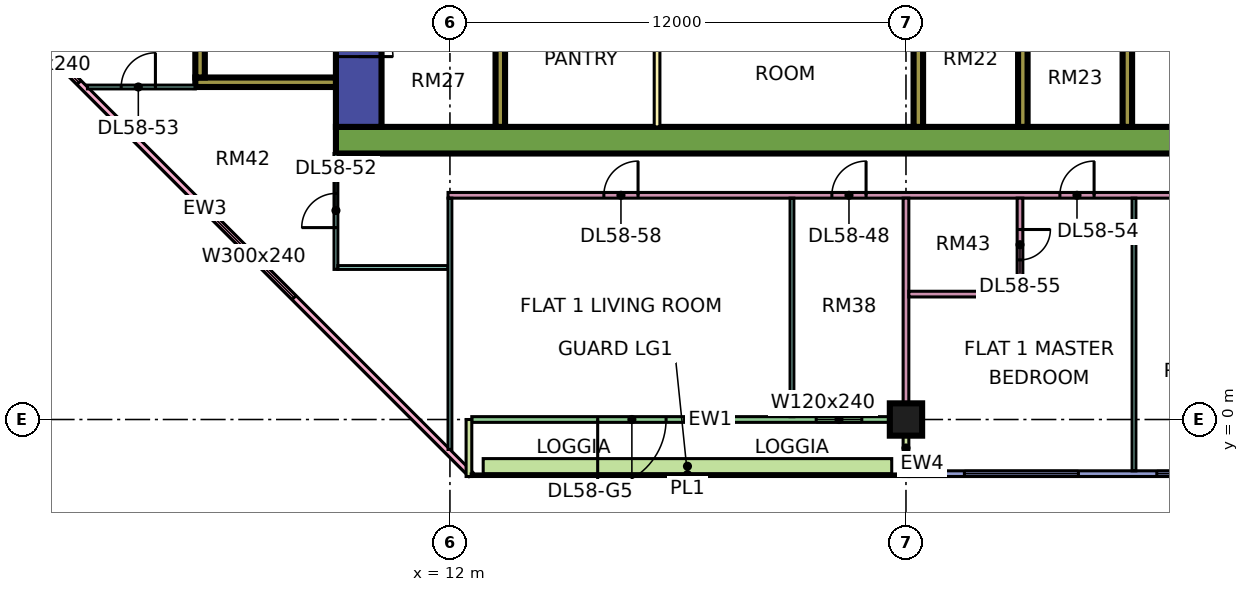
"""IFC4 building model, lengths in metres.
Left out: names, types, materials, properties, quantities, classifications, styles, units other than length and angle.
Written with IfcOpenShell. Run it as: python <this file> out.ifc"""

import sys

from ifc_helpers import new_model, si_unit, direction, frame, frame_2d, origin, origin_2d, place, context, subcontext, project, spatial, rectangle, extrude, element, fill, save


model = new_model("IFC4")
c1 = context("Model", 3, precision=1e-05, world=origin(), true_north=direction((0.0, 1.0)))
c2 = subcontext(c1, "Body", "Model", "MODEL_VIEW")
j1 = project(units=[si_unit("LENGTHUNIT", "METRE"), si_unit("PLANEANGLEUNIT", "RADIAN")], contexts=[c1])
p1 = place(None, origin())
s1 = spatial("IfcSite", under=j1, at=p1, CompositionType="ELEMENT")
p2 = place(p1, origin())
s2 = spatial("IfcBuilding", under=s1, at=p2, CompositionType="ELEMENT")
p3 = place(p2, frame((0.0, 0.0, 245.4)))
s3 = spatial("IfcBuildingStorey", under=s2, at=p3, CompositionType="ELEMENT", Elevation=245.4)
p4 = place(p3, frame((24.0, 0.0, 0.0), z_axis=(0.0, 0.0, 1.0), x_axis=(1.0, 0.0, 0.0)))
e1 = element("IfcColumn", 1, at=p4, inside=s3, PredefinedType="COLUMN", context=c2, shape_type="SweptSolid", body=[
    extrude(rectangle(XDim=0.85, YDim=0.85, at=origin_2d()), origin(), (0.0, 0.0, 1.0), 3.75),
])
p5 = place(p3, frame((9.0, 7.35, 0.0), z_axis=(0.0, 0.0, 1.0), x_axis=(1.0, 0.0, 0.0)))
e2 = element("IfcWall", 2, at=p5, inside=s3, PredefinedType="SHEAR", context=c2, shape_type="SweptSolid", body=[
    extrude(rectangle(XDim=25.0, YDim=0.7, at=frame_2d((12.5, 0.0))), origin(), (0.0, 0.0, 1.0), 3.75),
])
p6 = place(p3, frame((9.6, 7.7, 0.0), z_axis=(0.0, 0.0, 1.0), x_axis=(0.0, 1.0, 0.0)))
e3 = element("IfcWall", 3, at=p6, inside=s3, PredefinedType="SHEAR", context=c2, shape_type="SweptSolid", body=[
    extrude(rectangle(XDim=11.6, YDim=1.2, at=frame_2d((5.8, 0.0))), origin(), (0.0, 0.0, 1.0), 3.75),
])
p7 = place(p6, frame((4.175, 0.0, 0.0)))
e4 = element("IfcOpeningElement", 4, at=p7, cuts=e3, PredefinedType="OPENING", context=c2, shape_type="SweptSolid", body=[
    extrude(rectangle(XDim=1.1, YDim=2.2, at=frame_2d((0.55, 1.1))), frame((0.0, 0.61, 0.0), z_axis=(0.0, -1.0, 0.0), x_axis=(1.0, 0.0, 0.0)), (0.0, 0.0, 1.0), 1.22),
])
p8 = place(p6, frame((6.675, 0.0, 0.0)))
e5 = element("IfcOpeningElement", 5, at=p8, cuts=e3, PredefinedType="OPENING", context=c2, shape_type="SweptSolid", body=[
    extrude(rectangle(XDim=1.1, YDim=2.2, at=frame_2d((0.55, 1.1))), frame((0.0, 0.61, 0.0), z_axis=(0.0, -1.0, 0.0), x_axis=(1.0, 0.0, 0.0)), (0.0, 0.0, 1.0), 1.22),
])
p9 = place(p6, frame((9.55, 0.0, 0.0)))
e6 = element("IfcOpeningElement", 6, at=p9, cuts=e3, PredefinedType="OPENING", context=c2, shape_type="SweptSolid", body=[
    extrude(rectangle(XDim=1.1, YDim=2.2, at=frame_2d((0.55, 1.1))), frame((0.0, 0.61, 0.0), z_axis=(0.0, -1.0, 0.0), x_axis=(1.0, 0.0, 0.0)), (0.0, 0.0, 1.0), 1.22),
])
p10 = place(p6, frame((1.85, 0.0, 0.0)))
e7 = element("IfcOpeningElement", 7, at=p10, cuts=e3, PredefinedType="OPENING", context=c2, shape_type="SweptSolid", body=[
    extrude(rectangle(XDim=0.9, YDim=2.1, at=frame_2d((0.45, 1.05))), frame((0.0, 0.61, 0.0), z_axis=(0.0, -1.0, 0.0), x_axis=(1.0, 0.0, 0.0)), (0.0, 0.0, 1.0), 1.22),
])
p11 = place(p3, frame((13.325, 7.7, 0.0), z_axis=(0.0, 0.0, 1.0), x_axis=(0.0, 1.0, 0.0)))
e8 = element("IfcWall", 8, at=p11, inside=s3, PredefinedType="SHEAR", context=c2, shape_type="SweptSolid", body=[
    extrude(rectangle(XDim=11.6, YDim=0.25, at=frame_2d((5.8, 0.0))), origin(), (0.0, 0.0, 1.0), 3.75),
])
for number, where, z_axis, x_axis in (
    (9, (24.325, 7.7, 0.0), (0.0, 0.0, 1.0), (0.0, 1.0, 0.0)),
    (10, (27.075, 7.7, 0.0), (0.0, 0.0, 1.0), (0.0, 1.0, 0.0)),
    (11, (29.825, 7.7, 0.0), (0.0, 0.0, 1.0), (0.0, 1.0, 0.0)),
):
    element("IfcWall", number, at=place(p3, frame(where, z_axis=z_axis, x_axis=x_axis)), inside=s3, PredefinedType="SHEAR", context=c2, shape_type="SweptSolid", body=[
        extrude(rectangle(XDim=3.5, YDim=0.25, at=frame_2d((1.75, 0.0))), origin(), (0.0, 0.0, 1.0), 3.75),
    ])
p12 = place(p3, frame((5.3, 8.875, 0.0), z_axis=(0.0, 0.0, 1.0), x_axis=(1.0, 0.0, 0.0)))
e12 = element("IfcWall", 12, at=p12, inside=s3, PredefinedType="SHEAR", context=c2, shape_type="SweptSolid", body=[
    extrude(rectangle(XDim=3.7, YDim=0.25, at=frame_2d((1.85, 0.0))), origin(), (0.0, 0.0, 1.0), 3.75),
])
p13 = place(p3, frame((5.425, 9.0, 0.0), z_axis=(0.0, 0.0, 1.0), x_axis=(0.0, 1.0, 0.0)))
e13 = element("IfcWall", 13, at=p13, inside=s3, PredefinedType="SHEAR", context=c2, shape_type="SweptSolid", body=[
    extrude(rectangle(XDim=4.0, YDim=0.25, at=frame_2d((2.0, 0.0))), origin(), (0.0, 0.0, 1.0), 3.75),
])
p14 = place(p3, frame((-1.447, 12.553, 0.0), z_axis=(0.0, 0.0, 1.0), x_axis=(0.707106781187, -0.707106781187, 0.0)))
e14 = element("IfcWall", 14, at=p14, inside=s3, PredefinedType="SOLIDWALL", context=c2, shape_type="SweptSolid", body=[
    extrude(rectangle(XDim=19.799, YDim=0.15, at=frame_2d((9.899, 0.0))), origin(), (0.0, 0.0, 1.0), 3.35),
])
p15 = place(p14, frame((2.212, 0.0, 0.45)))
e15 = element("IfcOpeningElement", 15, at=p15, cuts=e14, PredefinedType="OPENING", context=c2, shape_type="SweptSolid", body=[
    extrude(rectangle(XDim=3.0, YDim=2.4, at=frame_2d((1.5, 1.2))), frame((0.0, 0.085, 0.0), z_axis=(0.0, -1.0, 0.0), x_axis=(1.0, 0.0, 0.0)), (0.0, 0.0, 1.0), 0.17),
])
p16 = place(p14, frame((10.216, 0.0, 0.45)))
e16 = element("IfcOpeningElement", 16, at=p16, cuts=e14, PredefinedType="OPENING", context=c2, shape_type="SweptSolid", body=[
    extrude(rectangle(XDim=3.0, YDim=2.4, at=frame_2d((1.5, 1.2))), frame((0.0, 0.085, 0.0), z_axis=(0.0, -1.0, 0.0), x_axis=(1.0, 0.0, 0.0)), (0.0, 0.0, 1.0), 0.17),
])
p17 = place(p3, frame((12.575, 0.0, 0.0), z_axis=(0.0, 0.0, 1.0), x_axis=(1.0, 0.0, 0.0)))
e17 = element("IfcWall", 17, at=p17, inside=s3, PredefinedType="SOLIDWALL", context=c2, shape_type="SweptSolid", body=[
    extrude(rectangle(XDim=11.35, YDim=0.15, at=frame_2d((5.675, 0.0))), origin(), (0.0, 0.0, 1.0), 3.35),
])
p18 = place(p17, frame((3.312, 0.0, 0.0)))
e18 = element("IfcOpeningElement", 18, at=p18, cuts=e17, PredefinedType="OPENING", context=c2, shape_type="SweptSolid", body=[
    extrude(rectangle(XDim=1.8, YDim=2.4, at=frame_2d((0.9, 1.2))), frame((0.0, 0.085, 0.0), z_axis=(0.0, -1.0, 0.0), x_axis=(1.0, 0.0, 0.0)), (0.0, 0.0, 1.0), 0.17),
])
p19 = place(p17, frame((9.062, 0.0, 0.45)))
e19 = element("IfcOpeningElement", 19, at=p19, cuts=e17, PredefinedType="OPENING", context=c2, shape_type="SweptSolid", body=[
    extrude(rectangle(XDim=1.2, YDim=2.4, at=frame_2d((0.6, 1.2))), frame((0.0, 0.085, 0.0), z_axis=(0.0, -1.0, 0.0), x_axis=(1.0, 0.0, 0.0)), (0.0, 0.0, 1.0), 0.17),
])
for number, where, z_axis, x_axis in (
    (20, (12.5, -1.5, 0.0), (0.0, 0.0, 1.0), (0.0, 1.0, 0.0)),
    (21, (24.0, -1.5, 0.0), (0.0, 0.0, 1.0), (0.0, 1.0, 0.0)),
):
    element("IfcWall", number, at=place(p3, frame(where, z_axis=z_axis, x_axis=x_axis)), inside=s3, PredefinedType="SOLIDWALL", context=c2, shape_type="SweptSolid", body=[
        extrude(rectangle(XDim=1.5, YDim=0.15, at=frame_2d((0.75, 0.0))), origin(), (0.0, 0.0, 1.0), 3.35),
    ])
p20 = place(p3, frame((24.075, -1.425, 0.0), z_axis=(0.0, 0.0, 1.0), x_axis=(1.0, 0.0, 0.0)))
e22 = element("IfcWall", 22, at=p20, inside=s3, PredefinedType="SOLIDWALL", context=c2, shape_type="SweptSolid", body=[
    extrude(rectangle(XDim=11.85, YDim=0.15, at=frame_2d((5.925, 0.0))), origin(), (0.0, 0.0, 1.0), 3.35),
])
p21 = place(p20, frame((1.462, 0.0, 0.45)))
e23 = element("IfcOpeningElement", 23, at=p21, cuts=e22, PredefinedType="OPENING", context=c2, shape_type="SweptSolid", body=[
    extrude(rectangle(XDim=3.0, YDim=2.4, at=frame_2d((1.5, 1.2))), frame((0.0, 0.085, 0.0), z_axis=(0.0, -1.0, 0.0), x_axis=(1.0, 0.0, 0.0)), (0.0, 0.0, 1.0), 0.17),
])
p22 = place(p20, frame((6.525, 0.0, 0.45)))
e24 = element("IfcOpeningElement", 24, at=p22, cuts=e22, PredefinedType="OPENING", context=c2, shape_type="SweptSolid", body=[
    extrude(rectangle(XDim=1.8, YDim=2.4, at=frame_2d((0.9, 1.2))), frame((0.0, 0.085, 0.0), z_axis=(0.0, -1.0, 0.0), x_axis=(1.0, 0.0, 0.0)), (0.0, 0.0, 1.0), 0.17),
])
p23 = place(p20, frame((9.488, 0.0, 0.45)))
e25 = element("IfcOpeningElement", 25, at=p23, cuts=e22, PredefinedType="OPENING", context=c2, shape_type="SweptSolid", body=[
    extrude(rectangle(XDim=1.8, YDim=2.4, at=frame_2d((0.9, 1.2))), frame((0.0, 0.085, 0.0), z_axis=(0.0, -1.0, 0.0), x_axis=(1.0, 0.0, 0.0)), (0.0, 0.0, 1.0), 0.17),
])
p24 = place(p3, frame((12.875, -1.229, 0.0), z_axis=(0.0, 0.0, 1.0), x_axis=(1.0, 0.0, 0.0)))
e26 = element("IfcWall", 26, at=p24, inside=s3, PredefinedType="SOLIDWALL", context=c2, shape_type="SweptSolid", body=[
    extrude(rectangle(XDim=10.75, YDim=0.4, at=frame_2d((5.375, 0.0))), origin(), (0.0, 0.0, 1.0), 0.7),
])
p25 = place(p3, frame((17.45, 7.7, 0.0), z_axis=(0.0, 0.0, 1.0), x_axis=(0.0, 1.0, 0.0)))
e27 = element("IfcWall", 27, at=p25, inside=s3, PredefinedType="PARTITIONING", context=c2, shape_type="SweptSolid", body=[
    extrude(rectangle(XDim=3.5, YDim=0.15, at=frame_2d((1.75, 0.0))), origin(), (0.0, 0.0, 1.0), 3.35),
])
p26 = place(p3, frame((2.461, 8.75, 0.0), z_axis=(0.0, 0.0, 1.0), x_axis=(1.0, 0.0, 0.0)))
e28 = element("IfcWall", 28, at=p26, inside=s3, PredefinedType="PARTITIONING", context=c2, shape_type="SweptSolid", body=[
    extrude(rectangle(XDim=2.839, YDim=0.1, at=frame_2d((1.419, 0.0))), origin(), (0.0, 0.0, 1.0), 3.35),
])
p27 = place(p26, frame((0.889, 0.0, 0.0)))
e29 = element("IfcOpeningElement", 29, at=p27, cuts=e28, PredefinedType="OPENING", context=c2, shape_type="SweptSolid", body=[
    extrude(rectangle(XDim=0.9, YDim=2.1, at=frame_2d((0.45, 1.05))), frame((0.0, 0.06, 0.0), z_axis=(0.0, -1.0, 0.0), x_axis=(1.0, 0.0, 0.0)), (0.0, 0.0, 1.0), 0.12),
])
p28 = place(p3, frame((9.0, 3.95, 0.0), z_axis=(0.0, 0.0, 1.0), x_axis=(0.0, 1.0, 0.0)))
e30 = element("IfcWall", 30, at=p28, inside=s3, PredefinedType="PARTITIONING", context=c2, shape_type="SweptSolid", body=[
    extrude(rectangle(XDim=3.05, YDim=0.1, at=frame_2d((1.525, 0.0))), origin(), (0.0, 0.0, 1.0), 3.35),
])
p29 = place(p28, frame((1.1, 0.0, 0.0)))
e31 = element("IfcOpeningElement", 31, at=p29, cuts=e30, PredefinedType="OPENING", context=c2, shape_type="SweptSolid", body=[
    extrude(rectangle(XDim=0.9, YDim=2.1, at=frame_2d((0.45, 1.05))), frame((0.0, 0.06, 0.0), z_axis=(0.0, -1.0, 0.0), x_axis=(1.0, 0.0, 0.0)), (0.0, 0.0, 1.0), 0.12),
])
p30 = place(p3, frame((9.05, 4.0, 0.0), z_axis=(0.0, 0.0, 1.0), x_axis=(1.0, 0.0, 0.0)))
e32 = element("IfcWall", 32, at=p30, inside=s3, PredefinedType="PARTITIONING", context=c2, shape_type="SweptSolid", body=[
    extrude(rectangle(XDim=2.9, YDim=0.1, at=frame_2d((1.45, 0.0))), origin(), (0.0, 0.0, 1.0), 3.35),
])
p31 = place(p3, frame((11.95, 5.9, 0.0), z_axis=(0.0, 0.0, 1.0), x_axis=(1.0, 0.0, 0.0)))
e33 = element("IfcWall", 33, at=p31, inside=s3, PredefinedType="PARTITIONING", context=c2, shape_type="SweptSolid", body=[
    extrude(rectangle(XDim=21.1, YDim=0.15, at=frame_2d((10.55, 0.0))), origin(), (0.0, 0.0, 1.0), 3.35),
])
p32 = place(p31, frame((10.1, 0.0, 0.0)))
e34 = element("IfcOpeningElement", 34, at=p32, cuts=e33, PredefinedType="OPENING", context=c2, shape_type="SweptSolid", body=[
    extrude(rectangle(XDim=0.9, YDim=2.1, at=frame_2d((0.45, 1.05))), frame((0.0, 0.085, 0.0), z_axis=(0.0, -1.0, 0.0), x_axis=(1.0, 0.0, 0.0)), (0.0, 0.0, 1.0), 0.17),
])
p33 = place(p31, frame((16.1, 0.0, 0.0)))
e35 = element("IfcOpeningElement", 35, at=p33, cuts=e33, PredefinedType="OPENING", context=c2, shape_type="SweptSolid", body=[
    extrude(rectangle(XDim=0.9, YDim=2.1, at=frame_2d((0.45, 1.05))), frame((0.0, 0.085, 0.0), z_axis=(0.0, -1.0, 0.0), x_axis=(1.0, 0.0, 0.0)), (0.0, 0.0, 1.0), 0.17),
])
p34 = place(p31, frame((4.1, 0.0, 0.0)))
e36 = element("IfcOpeningElement", 36, at=p34, cuts=e33, PredefinedType="OPENING", context=c2, shape_type="SweptSolid", body=[
    extrude(rectangle(XDim=0.9, YDim=2.1, at=frame_2d((0.45, 1.05))), frame((0.0, 0.085, 0.0), z_axis=(0.0, -1.0, 0.0), x_axis=(1.0, 0.0, 0.0)), (0.0, 0.0, 1.0), 0.17),
])
p35 = place(p3, frame((12.0, -0.788, 0.0), z_axis=(0.0, 0.0, 1.0), x_axis=(0.0, 1.0, 0.0)))
e37 = element("IfcWall", 37, at=p35, inside=s3, PredefinedType="PARTITIONING", context=c2, shape_type="SweptSolid", body=[
    extrude(rectangle(XDim=6.613, YDim=0.1, at=frame_2d((3.306, 0.0))), origin(), (0.0, 0.0, 1.0), 3.35),
])
p36 = place(p3, frame((21.0, 0.074, 0.0), z_axis=(0.0, 0.0, 1.0), x_axis=(0.0, 1.0, 0.0)))
e38 = element("IfcWall", 38, at=p36, inside=s3, PredefinedType="PARTITIONING", context=c2, shape_type="SweptSolid", body=[
    extrude(rectangle(XDim=5.751, YDim=0.1, at=frame_2d((2.875, 0.0))), origin(), (0.0, 0.0, 1.0), 3.35),
])
p37 = place(p3, frame((24.0, 0.0, 0.0), z_axis=(0.0, 0.0, 1.0), x_axis=(0.0, 1.0, 0.0)))
e39 = element("IfcWall", 39, at=p37, inside=s3, PredefinedType="PARTITIONING", context=c2, shape_type="SweptSolid", body=[
    extrude(rectangle(XDim=5.825, YDim=0.15, at=frame_2d((2.913, 0.0))), origin(), (0.0, 0.0, 1.0), 3.35),
])
p38 = place(p3, frame((24.075, 3.3, 0.0), z_axis=(0.0, 0.0, 1.0), x_axis=(1.0, 0.0, 0.0)))
e40 = element("IfcWall", 40, at=p38, inside=s3, PredefinedType="PARTITIONING", context=c2, shape_type="SweptSolid", body=[
    extrude(rectangle(XDim=3.0, YDim=0.15, at=frame_2d((1.5, 0.0))), origin(), (0.0, 0.0, 1.0), 3.35),
])
p39 = place(p3, frame((27.0, 3.375, 0.0), z_axis=(0.0, 0.0, 1.0), x_axis=(0.0, 1.0, 0.0)))
e41 = element("IfcWall", 41, at=p39, inside=s3, PredefinedType="PARTITIONING", context=c2, shape_type="SweptSolid", body=[
    extrude(rectangle(XDim=2.45, YDim=0.15, at=frame_2d((1.225, 0.0))), origin(), (0.0, 0.0, 1.0), 3.35),
])
p40 = place(p39, frame((0.825, 0.0, 0.0)))
e42 = element("IfcOpeningElement", 42, at=p40, cuts=e41, PredefinedType="OPENING", context=c2, shape_type="SweptSolid", body=[
    extrude(rectangle(XDim=0.8, YDim=2.1, at=frame_2d((0.4, 1.05))), frame((0.0, 0.085, 0.0), z_axis=(0.0, -1.0, 0.0), x_axis=(1.0, 0.0, 0.0)), (0.0, 0.0, 1.0), 0.17),
])
p41 = place(p3, frame((30.0, -1.351, 0.0), z_axis=(0.0, 0.0, 1.0), x_axis=(0.0, 1.0, 0.0)))
e43 = element("IfcWall", 43, at=p41, inside=s3, PredefinedType="PARTITIONING", context=c2, shape_type="SweptSolid", body=[
    extrude(rectangle(XDim=7.176, YDim=0.1, at=frame_2d((3.588, 0.0))), origin(), (0.0, 0.0, 1.0), 3.35),
])
p42 = place(p15, origin())
e44 = element("IfcWindow", 44, at=p42, inside=s3, PartitioningType="SINGLE_PANEL", PredefinedType="WINDOW", context=c2, shape_type="SweptSolid", body=[
    extrude(rectangle(XDim=3.0, YDim=2.4, at=frame_2d((1.5, 1.2))), frame((0.0, 0.03, 0.0), z_axis=(0.0, -1.0, 0.0), x_axis=(1.0, 0.0, 0.0)), (0.0, 0.0, 1.0), 0.06),
])
fill(e15, e44)
p43 = place(p16, origin())
e45 = element("IfcWindow", 45, at=p43, inside=s3, PartitioningType="SINGLE_PANEL", PredefinedType="WINDOW", context=c2, shape_type="SweptSolid", body=[
    extrude(rectangle(XDim=3.0, YDim=2.4, at=frame_2d((1.5, 1.2))), frame((0.0, 0.03, 0.0), z_axis=(0.0, -1.0, 0.0), x_axis=(1.0, 0.0, 0.0)), (0.0, 0.0, 1.0), 0.06),
])
fill(e16, e45)
p44 = place(p18, frame((1.8, 0.0, 0.0), z_axis=(0.0, 0.0, 1.0), x_axis=(-1.0, 0.0, 0.0)))
e46 = element("IfcDoor", 46, at=p44, inside=s3, OperationType="DOUBLE_DOOR_SINGLE_SWING", PredefinedType="DOOR", context=c2, shape_type="SweptSolid", body=[
    extrude(rectangle(XDim=1.8, YDim=2.4, at=frame_2d((0.9, 1.2))), frame((0.0, 0.025, 0.0), z_axis=(0.0, -1.0, 0.0), x_axis=(1.0, 0.0, 0.0)), (0.0, 0.0, 1.0), 0.05),
])
fill(e18, e46)
p45 = place(p19, origin())
e47 = element("IfcWindow", 47, at=p45, inside=s3, PartitioningType="SINGLE_PANEL", PredefinedType="WINDOW", context=c2, shape_type="SweptSolid", body=[
    extrude(rectangle(XDim=1.2, YDim=2.4, at=frame_2d((0.6, 1.2))), frame((0.0, 0.03, 0.0), z_axis=(0.0, -1.0, 0.0), x_axis=(1.0, 0.0, 0.0)), (0.0, 0.0, 1.0), 0.06),
])
fill(e19, e47)
p46 = place(p21, origin())
e48 = element("IfcWindow", 48, at=p46, inside=s3, PartitioningType="SINGLE_PANEL", PredefinedType="WINDOW", context=c2, shape_type="SweptSolid", body=[
    extrude(rectangle(XDim=3.0, YDim=2.4, at=frame_2d((1.5, 1.2))), frame((0.0, 0.03, 0.0), z_axis=(0.0, -1.0, 0.0), x_axis=(1.0, 0.0, 0.0)), (0.0, 0.0, 1.0), 0.06),
])
fill(e23, e48)
p47 = place(p22, origin())
e49 = element("IfcWindow", 49, at=p47, inside=s3, PartitioningType="SINGLE_PANEL", PredefinedType="WINDOW", context=c2, shape_type="SweptSolid", body=[
    extrude(rectangle(XDim=1.8, YDim=2.4, at=frame_2d((0.9, 1.2))), frame((0.0, 0.03, 0.0), z_axis=(0.0, -1.0, 0.0), x_axis=(1.0, 0.0, 0.0)), (0.0, 0.0, 1.0), 0.06),
])
fill(e24, e49)
p48 = place(p10, frame((0.9, 0.0, 0.0), z_axis=(0.0, 0.0, 1.0), x_axis=(-1.0, 0.0, 0.0)))
e50 = element("IfcDoor", 50, at=p48, inside=s3, OperationType="SINGLE_SWING_LEFT", PredefinedType="DOOR", context=c2, shape_type="SweptSolid", body=[
    extrude(rectangle(XDim=0.9, YDim=2.1, at=frame_2d((0.45, 1.05))), frame((0.0, 0.025, 0.0), z_axis=(0.0, -1.0, 0.0), x_axis=(1.0, 0.0, 0.0)), (0.0, 0.0, 1.0), 0.05),
])
fill(e7, e50)
p49 = place(p32, frame((0.9, 0.0, 0.0), z_axis=(0.0, 0.0, 1.0), x_axis=(-1.0, 0.0, 0.0)))
e51 = element("IfcDoor", 51, at=p49, inside=s3, OperationType="SINGLE_SWING_RIGHT", PredefinedType="DOOR", context=c2, shape_type="SweptSolid", body=[
    extrude(rectangle(XDim=0.9, YDim=2.1, at=frame_2d((0.45, 1.05))), frame((0.0, 0.025, 0.0), z_axis=(0.0, -1.0, 0.0), x_axis=(1.0, 0.0, 0.0)), (0.0, 0.0, 1.0), 0.05),
])
fill(e34, e51)
p50 = place(p29, origin())
e52 = element("IfcDoor", 52, at=p50, inside=s3, OperationType="SINGLE_SWING_LEFT", PredefinedType="DOOR", context=c2, shape_type="SweptSolid", body=[
    extrude(rectangle(XDim=0.9, YDim=2.1, at=frame_2d((0.45, 1.05))), frame((0.0, 0.025, 0.0), z_axis=(0.0, -1.0, 0.0), x_axis=(1.0, 0.0, 0.0)), (0.0, 0.0, 1.0), 0.05),
])
fill(e31, e52)
p51 = place(p27, frame((0.9, 0.0, 0.0), z_axis=(0.0, 0.0, 1.0), x_axis=(-1.0, 0.0, 0.0)))
e53 = element("IfcDoor", 53, at=p51, inside=s3, OperationType="SINGLE_SWING_RIGHT", PredefinedType="DOOR", context=c2, shape_type="SweptSolid", body=[
    extrude(rectangle(XDim=0.9, YDim=2.1, at=frame_2d((0.45, 1.05))), frame((0.0, 0.025, 0.0), z_axis=(0.0, -1.0, 0.0), x_axis=(1.0, 0.0, 0.0)), (0.0, 0.0, 1.0), 0.05),
])
fill(e29, e53)
p52 = place(p33, frame((0.9, 0.0, 0.0), z_axis=(0.0, 0.0, 1.0), x_axis=(-1.0, 0.0, 0.0)))
e54 = element("IfcDoor", 54, at=p52, inside=s3, OperationType="SINGLE_SWING_RIGHT", PredefinedType="DOOR", context=c2, shape_type="SweptSolid", body=[
    extrude(rectangle(XDim=0.9, YDim=2.1, at=frame_2d((0.45, 1.05))), frame((0.0, 0.025, 0.0), z_axis=(0.0, -1.0, 0.0), x_axis=(1.0, 0.0, 0.0)), (0.0, 0.0, 1.0), 0.05),
])
fill(e35, e54)
p53 = place(p40, origin())
e55 = element("IfcDoor", 55, at=p53, inside=s3, OperationType="SINGLE_SWING_RIGHT", PredefinedType="DOOR", context=c2, shape_type="SweptSolid", body=[
    extrude(rectangle(XDim=0.8, YDim=2.1, at=frame_2d((0.4, 1.05))), frame((0.0, 0.025, 0.0), z_axis=(0.0, -1.0, 0.0), x_axis=(1.0, 0.0, 0.0)), (0.0, 0.0, 1.0), 0.05),
])
fill(e42, e55)
p54 = place(p34, frame((0.9, 0.0, 0.0), z_axis=(0.0, 0.0, 1.0), x_axis=(-1.0, 0.0, 0.0)))
e56 = element("IfcDoor", 56, at=p54, inside=s3, OperationType="SINGLE_SWING_RIGHT", PredefinedType="DOOR", context=c2, shape_type="SweptSolid", body=[
    extrude(rectangle(XDim=0.9, YDim=2.1, at=frame_2d((0.45, 1.05))), frame((0.0, 0.025, 0.0), z_axis=(0.0, -1.0, 0.0), x_axis=(1.0, 0.0, 0.0)), (0.0, 0.0, 1.0), 0.05),
])
fill(e36, e56)
save(model, sys.argv[1])
